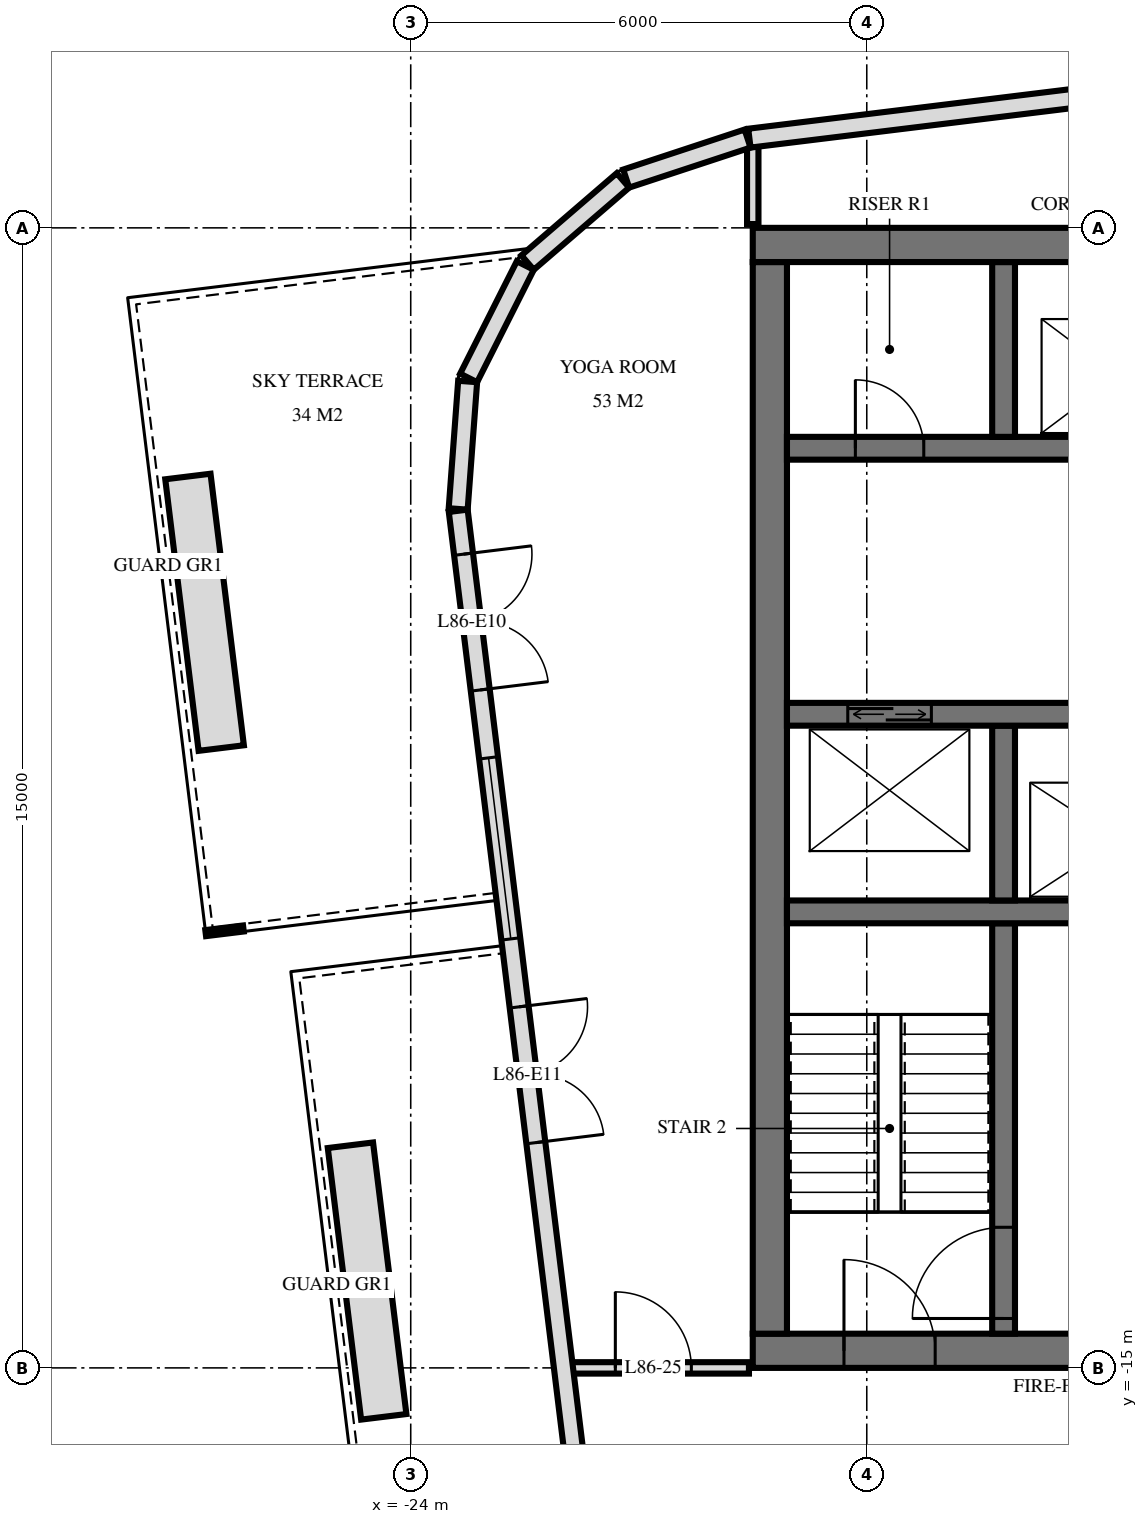
"""IFC4 building model, lengths in metres.
Left out: names, types, materials, properties, quantities, classifications, styles, units other than length and angle.
Written with IfcOpenShell. Run it as: python <this file> out.ifc"""

import sys

from ifc_helpers import new_model, si_unit, direction, frame, frame_2d, origin, place, context, subcontext, project, spatial, rectangle, extrude, element, fill, save


model = new_model("IFC4")
c1 = context("Model", 3, precision=1e-05, world=origin(), true_north=direction((0.0, 1.0)))
c2 = subcontext(c1, "Body", "Model", "MODEL_VIEW")
j1 = project(units=[si_unit("LENGTHUNIT", "METRE"), si_unit("PLANEANGLEUNIT", "RADIAN")], contexts=[c1])
p1 = place(None, origin())
s1 = spatial("IfcSite", under=j1, at=p1, CompositionType="ELEMENT")
p2 = place(p1, origin())
s2 = spatial("IfcBuilding", under=s1, at=p2, CompositionType="ELEMENT")
p3 = place(p2, frame((0.0, 0.0, 326.6)))
s3 = spatial("IfcBuildingStorey", under=s2, at=p3, CompositionType="ELEMENT", Elevation=326.6)
p4 = place(p3, frame((-19.5, -0.225, 0.0), z_axis=(0.0, 0.0, 1.0), x_axis=(1.0, 0.0, 0.0)))
e1 = element("IfcWall", 1, at=p4, inside=s3, PredefinedType="SHEAR", context=c2, shape_type="SweptSolid", body=[
    extrude(rectangle(XDim=9.5, YDim=0.45, at=frame_2d((4.75, 0.0))), origin(), (0.0, 0.0, 1.0), 4.0),
])
p5 = place(p3, frame((-19.5, -14.775, 0.0), z_axis=(0.0, 0.0, 1.0), x_axis=(1.0, 0.0, 0.0)))
e2 = element("IfcWall", 2, at=p5, inside=s3, PredefinedType="SHEAR", context=c2, shape_type="SweptSolid", body=[
    extrude(rectangle(XDim=9.5, YDim=0.45, at=frame_2d((4.75, 0.0))), origin(), (0.0, 0.0, 1.0), 4.0),
])
p6 = place(p5, frame((1.2, 0.0, 0.0)))
e3 = element("IfcOpeningElement", 3, at=p6, cuts=e2, PredefinedType="OPENING", context=c2, shape_type="SweptSolid", body=[
    extrude(rectangle(XDim=1.2, YDim=2.1, at=frame_2d((0.6, 1.05))), frame((0.0, 0.235, 0.0), z_axis=(0.0, -1.0, 0.0), x_axis=(1.0, 0.0, 0.0)), (0.0, 0.0, 1.0), 0.47),
])
p7 = place(p5, frame((4.25, 0.0, 0.0)))
e4 = element("IfcOpeningElement", 4, at=p7, cuts=e2, PredefinedType="OPENING", context=c2, shape_type="SweptSolid", body=[
    extrude(rectangle(XDim=1.1, YDim=2.1, at=frame_2d((0.55, 1.05))), frame((0.0, 0.235, 0.0), z_axis=(0.0, -1.0, 0.0), x_axis=(1.0, 0.0, 0.0)), (0.0, 0.0, 1.0), 0.47),
])
p8 = place(p3, frame((-19.275, -14.55, 0.0), z_axis=(0.0, 0.0, 1.0), x_axis=(0.0, 1.0, 0.0)))
e5 = element("IfcWall", 5, at=p8, inside=s3, PredefinedType="SHEAR", context=c2, shape_type="SweptSolid", body=[
    extrude(rectangle(XDim=14.1, YDim=0.45, at=frame_2d((7.05, 0.0))), origin(), (0.0, 0.0, 1.0), 4.0),
])
p9 = place(p3, frame((-19.05, -2.9, 0.0), z_axis=(0.0, 0.0, 1.0), x_axis=(1.0, 0.0, 0.0)))
e6 = element("IfcWall", 6, at=p9, inside=s3, PredefinedType="SHEAR", context=c2, shape_type="SweptSolid", body=[
    extrude(rectangle(XDim=8.7, YDim=0.3, at=frame_2d((4.35, 0.0))), origin(), (0.0, 0.0, 1.0), 4.0),
])
p10 = place(p9, frame((6.8, 0.0, 0.0)))
e7 = element("IfcOpeningElement", 7, at=p10, cuts=e6, PredefinedType="OPENING", context=c2, shape_type="SweptSolid", body=[
    extrude(rectangle(XDim=1.1, YDim=2.1, at=frame_2d((0.55, 1.05))), frame((0.0, 0.16, 0.0), z_axis=(0.0, -1.0, 0.0), x_axis=(1.0, 0.0, 0.0)), (0.0, 0.0, 1.0), 0.32),
])
p11 = place(p9, frame((3.8, 0.0, 0.0)))
e8 = element("IfcOpeningElement", 8, at=p11, cuts=e6, PredefinedType="OPENING", context=c2, shape_type="SweptSolid", body=[
    extrude(rectangle(XDim=1.1, YDim=2.1, at=frame_2d((0.55, 1.05))), frame((0.0, 0.16, 0.0), z_axis=(0.0, -1.0, 0.0), x_axis=(1.0, 0.0, 0.0)), (0.0, 0.0, 1.0), 0.32),
])
p12 = place(p9, frame((0.9, 0.0, 0.0)))
e9 = element("IfcOpeningElement", 9, at=p12, cuts=e6, PredefinedType="OPENING", context=c2, shape_type="SweptSolid", body=[
    extrude(rectangle(XDim=0.9, YDim=2.1, at=frame_2d((0.45, 1.05))), frame((0.0, 0.16, 0.0), z_axis=(0.0, -1.0, 0.0), x_axis=(1.0, 0.0, 0.0)), (0.0, 0.0, 1.0), 0.32),
])
p13 = place(p3, frame((-19.05, -6.4, 0.0), z_axis=(0.0, 0.0, 1.0), x_axis=(1.0, 0.0, 0.0)))
e10 = element("IfcWall", 10, at=p13, inside=s3, PredefinedType="SHEAR", context=c2, shape_type="SweptSolid", body=[
    extrude(rectangle(XDim=8.7, YDim=0.3, at=frame_2d((4.35, 0.0))), origin(), (0.0, 0.0, 1.0), 4.0),
])
p14 = place(p13, frame((0.8, 0.0, 0.0)))
e11 = element("IfcOpeningElement", 11, at=p14, cuts=e10, PredefinedType="OPENING", context=c2, shape_type="SweptSolid", body=[
    extrude(rectangle(XDim=1.1, YDim=2.1, at=frame_2d((0.55, 1.05))), frame((0.0, 0.16, 0.0), z_axis=(0.0, -1.0, 0.0), x_axis=(1.0, 0.0, 0.0)), (0.0, 0.0, 1.0), 0.32),
])
p15 = place(p3, frame((-19.05, -9.0, 0.0), z_axis=(0.0, 0.0, 1.0), x_axis=(1.0, 0.0, 0.0)))
e12 = element("IfcWall", 12, at=p15, inside=s3, PredefinedType="SHEAR", context=c2, shape_type="SweptSolid", body=[
    extrude(rectangle(XDim=8.7, YDim=0.3, at=frame_2d((4.35, 0.0))), origin(), (0.0, 0.0, 1.0), 4.0),
])
p16 = place(p15, frame((3.8, 0.0, 0.0)))
e13 = element("IfcOpeningElement", 13, at=p16, cuts=e12, PredefinedType="OPENING", context=c2, shape_type="SweptSolid", body=[
    extrude(rectangle(XDim=1.1, YDim=2.1, at=frame_2d((0.55, 1.05))), frame((0.0, 0.16, 0.0), z_axis=(0.0, -1.0, 0.0), x_axis=(1.0, 0.0, 0.0)), (0.0, 0.0, 1.0), 0.32),
])
for number, where, z_axis, x_axis in (
    (14, (-16.2, -2.75, 0.0), (0.0, 0.0, 1.0), (0.0, 1.0, 0.0)),
    (15, (-16.2, -8.85, 0.0), (0.0, 0.0, 1.0), (0.0, 1.0, 0.0)),
):
    element("IfcWall", number, at=place(p3, frame(where, z_axis=z_axis, x_axis=x_axis)), inside=s3, PredefinedType="SHEAR", context=c2, shape_type="SweptSolid", body=[
        extrude(rectangle(XDim=2.3, YDim=0.3, at=frame_2d((1.15, 0.0))), origin(), (0.0, 0.0, 1.0), 4.0),
    ])
p17 = place(p3, frame((-16.2, -14.55, 0.0), z_axis=(0.0, 0.0, 1.0), x_axis=(0.0, 1.0, 0.0)))
e16 = element("IfcWall", 16, at=p17, inside=s3, PredefinedType="SHEAR", context=c2, shape_type="SweptSolid", body=[
    extrude(rectangle(XDim=5.4, YDim=0.3, at=frame_2d((2.7, 0.0))), origin(), (0.0, 0.0, 1.0), 4.0),
])
p18 = place(p17, frame((0.2, 0.0, 0.0)))
e17 = element("IfcOpeningElement", 17, at=p18, cuts=e16, PredefinedType="OPENING", context=c2, shape_type="SweptSolid", body=[
    extrude(rectangle(XDim=1.2, YDim=2.1, at=frame_2d((0.6, 1.05))), frame((0.0, 0.16, 0.0), z_axis=(0.0, -1.0, 0.0), x_axis=(1.0, 0.0, 0.0)), (0.0, 0.0, 1.0), 0.32),
])
p19 = place(p3, frame((16.138, 5.561, 0.0), z_axis=(0.0, 0.0, 1.0), x_axis=(-0.992546726876, -0.121864658405, 0.0)))
e18 = element("IfcWall", 18, at=p19, inside=s3, PredefinedType="SOLIDWALL", context=c2, shape_type="SweptSolid", body=[
    extrude(rectangle(XDim=35.951, YDim=0.25, at=frame_2d((17.975, 0.0))), origin(), (0.0, 0.0, 1.0), 3.72),
])
p20 = place(p19, frame((12.275, 0.0, 0.0)))
e19 = element("IfcOpeningElement", 19, at=p20, cuts=e18, PredefinedType="OPENING", context=c2, shape_type="SweptSolid", body=[
    extrude(rectangle(XDim=2.4, YDim=2.4, at=frame_2d((1.2, 1.2))), frame((0.0, 0.135, 0.0), z_axis=(0.0, -1.0, 0.0), x_axis=(1.0, 0.0, 0.0)), (0.0, 0.0, 1.0), 0.27),
])
p21 = place(p19, frame((17.865, 0.0, 0.0)))
e20 = element("IfcOpeningElement", 20, at=p21, cuts=e18, PredefinedType="OPENING", context=c2, shape_type="SweptSolid", body=[
    extrude(rectangle(XDim=2.4, YDim=2.4, at=frame_2d((1.2, 1.2))), frame((0.0, 0.135, 0.0), z_axis=(0.0, -1.0, 0.0), x_axis=(1.0, 0.0, 0.0)), (0.0, 0.0, 1.0), 0.27),
])
p22 = place(p19, frame((21.275, 0.0, 0.0)))
e21 = element("IfcOpeningElement", 21, at=p22, cuts=e18, PredefinedType="OPENING", context=c2, shape_type="SweptSolid", body=[
    extrude(rectangle(XDim=2.4, YDim=2.4, at=frame_2d((1.2, 1.2))), frame((0.0, 0.135, 0.0), z_axis=(0.0, -1.0, 0.0), x_axis=(1.0, 0.0, 0.0)), (0.0, 0.0, 1.0), 0.27),
])
p23 = place(p3, frame((-19.568, 1.175, 0.0), z_axis=(0.0, 0.0, 1.0), x_axis=(-0.949694735798, -0.313177120489, 0.0)))
e22 = element("IfcWall", 22, at=p23, inside=s3, PredefinedType="SOLIDWALL", context=c2, shape_type="SweptSolid", body=[
    extrude(rectangle(XDim=1.681, YDim=0.25, at=frame_2d((0.841, 0.0))), origin(), (0.0, 0.0, 1.0), 3.72),
])
p24 = place(p3, frame((-21.208, 0.624, 0.0), z_axis=(0.0, 0.0, 1.0), x_axis=(-0.757568315466, -0.652755886531, 0.0)))
e23 = element("IfcWall", 23, at=p24, inside=s3, PredefinedType="SOLIDWALL", context=c2, shape_type="SweptSolid", body=[
    extrude(rectangle(XDim=1.656, YDim=0.25, at=frame_2d((0.828, 0.0))), origin(), (0.0, 0.0, 1.0), 3.72),
])
p25 = place(p3, frame((-22.493, -0.495, 0.0), z_axis=(0.0, 0.0, 1.0), x_axis=(-0.449982385812, -0.893037430604, 0.0)))
e24 = element("IfcWall", 24, at=p25, inside=s3, PredefinedType="SOLIDWALL", context=c2, shape_type="SweptSolid", body=[
    extrude(rectangle(XDim=1.656, YDim=0.25, at=frame_2d((0.828, 0.0))), origin(), (0.0, 0.0, 1.0), 3.72),
])
p26 = place(p3, frame((-23.251, -2.021, 0.0), z_axis=(0.0, 0.0, 1.0), x_axis=(-0.074053534713, -0.997254267475, 0.0)))
e25 = element("IfcWall", 25, at=p26, inside=s3, PredefinedType="SOLIDWALL", context=c2, shape_type="SweptSolid", body=[
    extrude(rectangle(XDim=1.681, YDim=0.25, at=frame_2d((0.841, 0.0))), origin(), (0.0, 0.0, 1.0), 3.72),
])
p27 = place(p3, frame((-23.375, -3.723, 0.0), z_axis=(0.0, 0.0, 1.0), x_axis=(0.121862878281, -0.992546945437, 0.0)))
e26 = element("IfcWall", 26, at=p27, inside=s3, PredefinedType="SOLIDWALL", context=c2, shape_type="SweptSolid", body=[
    extrude(rectangle(XDim=19.151, YDim=0.25, at=frame_2d((9.575, 0.0))), origin(), (0.0, 0.0, 1.0), 3.72),
])
p28 = place(p27, frame((0.575, 0.0, 0.0)))
e27 = element("IfcOpeningElement", 27, at=p28, cuts=e26, PredefinedType="OPENING", context=c2, shape_type="SweptSolid", body=[
    extrude(rectangle(XDim=1.8, YDim=2.4, at=frame_2d((0.9, 1.2))), frame((0.0, 0.135, 0.0), z_axis=(0.0, -1.0, 0.0), x_axis=(1.0, 0.0, 0.0)), (0.0, 0.0, 1.0), 0.27),
])
p29 = place(p27, frame((3.275, 0.0, 0.0)))
e28 = element("IfcOpeningElement", 28, at=p29, cuts=e26, PredefinedType="OPENING", context=c2, shape_type="SweptSolid", body=[
    extrude(rectangle(XDim=2.4, YDim=2.4, at=frame_2d((1.2, 1.2))), frame((0.0, 0.135, 0.0), z_axis=(0.0, -1.0, 0.0), x_axis=(1.0, 0.0, 0.0)), (0.0, 0.0, 1.0), 0.27),
])
p30 = place(p27, frame((6.576, 0.0, 0.0)))
e29 = element("IfcOpeningElement", 29, at=p30, cuts=e26, PredefinedType="OPENING", context=c2, shape_type="SweptSolid", body=[
    extrude(rectangle(XDim=1.8, YDim=2.4, at=frame_2d((0.9, 1.2))), frame((0.0, 0.135, 0.0), z_axis=(0.0, -1.0, 0.0), x_axis=(1.0, 0.0, 0.0)), (0.0, 0.0, 1.0), 0.27),
])
p31 = place(p27, frame((15.775, 0.0, 0.0)))
e30 = element("IfcOpeningElement", 30, at=p31, cuts=e26, PredefinedType="OPENING", context=c2, shape_type="SweptSolid", body=[
    extrude(rectangle(XDim=1.8, YDim=2.4, at=frame_2d((0.9, 1.2))), frame((0.0, 0.135, 0.0), z_axis=(0.0, -1.0, 0.0), x_axis=(1.0, 0.0, 0.0)), (0.0, 0.0, 1.0), 0.27),
])
for number, where, z_axis, x_axis in (
    (31, (-24.355, -15.644, 0.0), (0.0, 0.0, 1.0), (-0.122, 0.993, 0.0)),
    (32, (-26.493, -6.845, 0.0), (0.0, 0.0, 1.0), (-0.122, 0.993, 0.0)),
):
    element("IfcWall", number, at=place(p3, frame(where, z_axis=z_axis, x_axis=x_axis)), inside=s3, PredefinedType="USERDEFINED", context=c2, shape_type="SweptSolid", body=[
        extrude(rectangle(XDim=3.6, YDim=0.6, at=frame_2d((1.8, 0.0))), origin(), (0.0, 0.0, 1.0), 0.65),
    ])
p32 = place(p3, frame((-19.5, 0.05, 0.0), z_axis=(0.0, 0.0, 1.0), x_axis=(0.0, 1.0, 0.0)))
e33 = element("IfcWall", 33, at=p32, inside=s3, PredefinedType="PARTITIONING", context=c2, shape_type="SweptSolid", body=[
    extrude(rectangle(XDim=1.08, YDim=0.15, at=frame_2d((0.54, 0.0))), origin(), (0.0, 0.0, 1.0), 3.72),
])
p33 = place(p3, frame((-21.935, -15.0, 0.0), z_axis=(0.0, 0.0, 1.0), x_axis=(1.0, 0.0, 0.0)))
e34 = element("IfcWall", 34, at=p33, inside=s3, PredefinedType="PARTITIONING", context=c2, shape_type="SweptSolid", body=[
    extrude(rectangle(XDim=2.385, YDim=0.15, at=frame_2d((1.192, 0.0))), origin(), (0.0, 0.0, 1.0), 3.72),
])
p34 = place(p33, frame((0.627, 0.0, 0.0)))
e35 = element("IfcOpeningElement", 35, at=p34, cuts=e34, PredefinedType="OPENING", context=c2, shape_type="SweptSolid", body=[
    extrude(rectangle(XDim=1.0, YDim=2.1, at=frame_2d((0.5, 1.05))), frame((0.0, 0.085, 0.0), z_axis=(0.0, -1.0, 0.0), x_axis=(1.0, 0.0, 0.0)), (0.0, 0.0, 1.0), 0.17),
])
p35 = place(p28, origin())
e36 = element("IfcDoor", 36, at=p35, inside=s3, OperationType="DOUBLE_DOOR_SINGLE_SWING", PredefinedType="DOOR", context=c2, shape_type="SweptSolid", body=[
    extrude(rectangle(XDim=1.8, YDim=2.4, at=frame_2d((0.9, 1.2))), frame((0.0, 0.025, 0.0), z_axis=(0.0, -1.0, 0.0), x_axis=(1.0, 0.0, 0.0)), (0.0, 0.0, 1.0), 0.05),
])
fill(e27, e36)
p36 = place(p29, origin())
e37 = element("IfcWindow", 37, at=p36, inside=s3, PartitioningType="SINGLE_PANEL", PredefinedType="WINDOW", context=c2, shape_type="SweptSolid", body=[
    extrude(rectangle(XDim=2.4, YDim=2.4, at=frame_2d((1.2, 1.2))), frame((0.0, 0.03, 0.0), z_axis=(0.0, -1.0, 0.0), x_axis=(1.0, 0.0, 0.0)), (0.0, 0.0, 1.0), 0.06),
])
fill(e28, e37)
p37 = place(p30, origin())
e38 = element("IfcDoor", 38, at=p37, inside=s3, OperationType="DOUBLE_DOOR_SINGLE_SWING", PredefinedType="DOOR", context=c2, shape_type="SweptSolid", body=[
    extrude(rectangle(XDim=1.8, YDim=2.4, at=frame_2d((0.9, 1.2))), frame((0.0, 0.025, 0.0), z_axis=(0.0, -1.0, 0.0), x_axis=(1.0, 0.0, 0.0)), (0.0, 0.0, 1.0), 0.05),
])
fill(e29, e38)
p38 = place(p14, origin())
e39 = element("IfcDoor", 39, at=p38, inside=s3, OperationType="DOUBLE_DOOR_SLIDING", PredefinedType="USERDEFINED", context=c2, shape_type="SweptSolid", body=[
    extrude(rectangle(XDim=1.1, YDim=2.1, at=frame_2d((0.55, 1.05))), frame((0.0, 0.025, 0.0), z_axis=(0.0, -1.0, 0.0), x_axis=(1.0, 0.0, 0.0)), (0.0, 0.0, 1.0), 0.05),
])
fill(e11, e39)
p39 = place(p6, origin())
e40 = element("IfcDoor", 40, at=p39, inside=s3, OperationType="SINGLE_SWING_RIGHT", PredefinedType="DOOR", context=c2, shape_type="SweptSolid", body=[
    extrude(rectangle(XDim=1.2, YDim=2.1, at=frame_2d((0.6, 1.05))), frame((0.0, 0.025, 0.0), z_axis=(0.0, -1.0, 0.0), x_axis=(1.0, 0.0, 0.0)), (0.0, 0.0, 1.0), 0.05),
])
fill(e3, e40)
p40 = place(p12, origin())
e41 = element("IfcDoor", 41, at=p40, inside=s3, OperationType="SINGLE_SWING_RIGHT", PredefinedType="DOOR", context=c2, shape_type="SweptSolid", body=[
    extrude(rectangle(XDim=0.9, YDim=2.1, at=frame_2d((0.45, 1.05))), frame((0.0, 0.025, 0.0), z_axis=(0.0, -1.0, 0.0), x_axis=(1.0, 0.0, 0.0)), (0.0, 0.0, 1.0), 0.05),
])
fill(e9, e41)
p41 = place(p18, origin())
e42 = element("IfcDoor", 42, at=p41, inside=s3, OperationType="SINGLE_SWING_RIGHT", PredefinedType="DOOR", context=c2, shape_type="SweptSolid", body=[
    extrude(rectangle(XDim=1.2, YDim=2.1, at=frame_2d((0.6, 1.05))), frame((0.0, 0.025, 0.0), z_axis=(0.0, -1.0, 0.0), x_axis=(1.0, 0.0, 0.0)), (0.0, 0.0, 1.0), 0.05),
])
fill(e17, e42)
p42 = place(p34, origin())
e43 = element("IfcDoor", 43, at=p42, inside=s3, OperationType="SINGLE_SWING_RIGHT", PredefinedType="DOOR", context=c2, shape_type="SweptSolid", body=[
    extrude(rectangle(XDim=1.0, YDim=2.1, at=frame_2d((0.5, 1.05))), frame((0.0, 0.025, 0.0), z_axis=(0.0, -1.0, 0.0), x_axis=(1.0, 0.0, 0.0)), (0.0, 0.0, 1.0), 0.05),
])
fill(e35, e43)
save(model, sys.argv[1])
